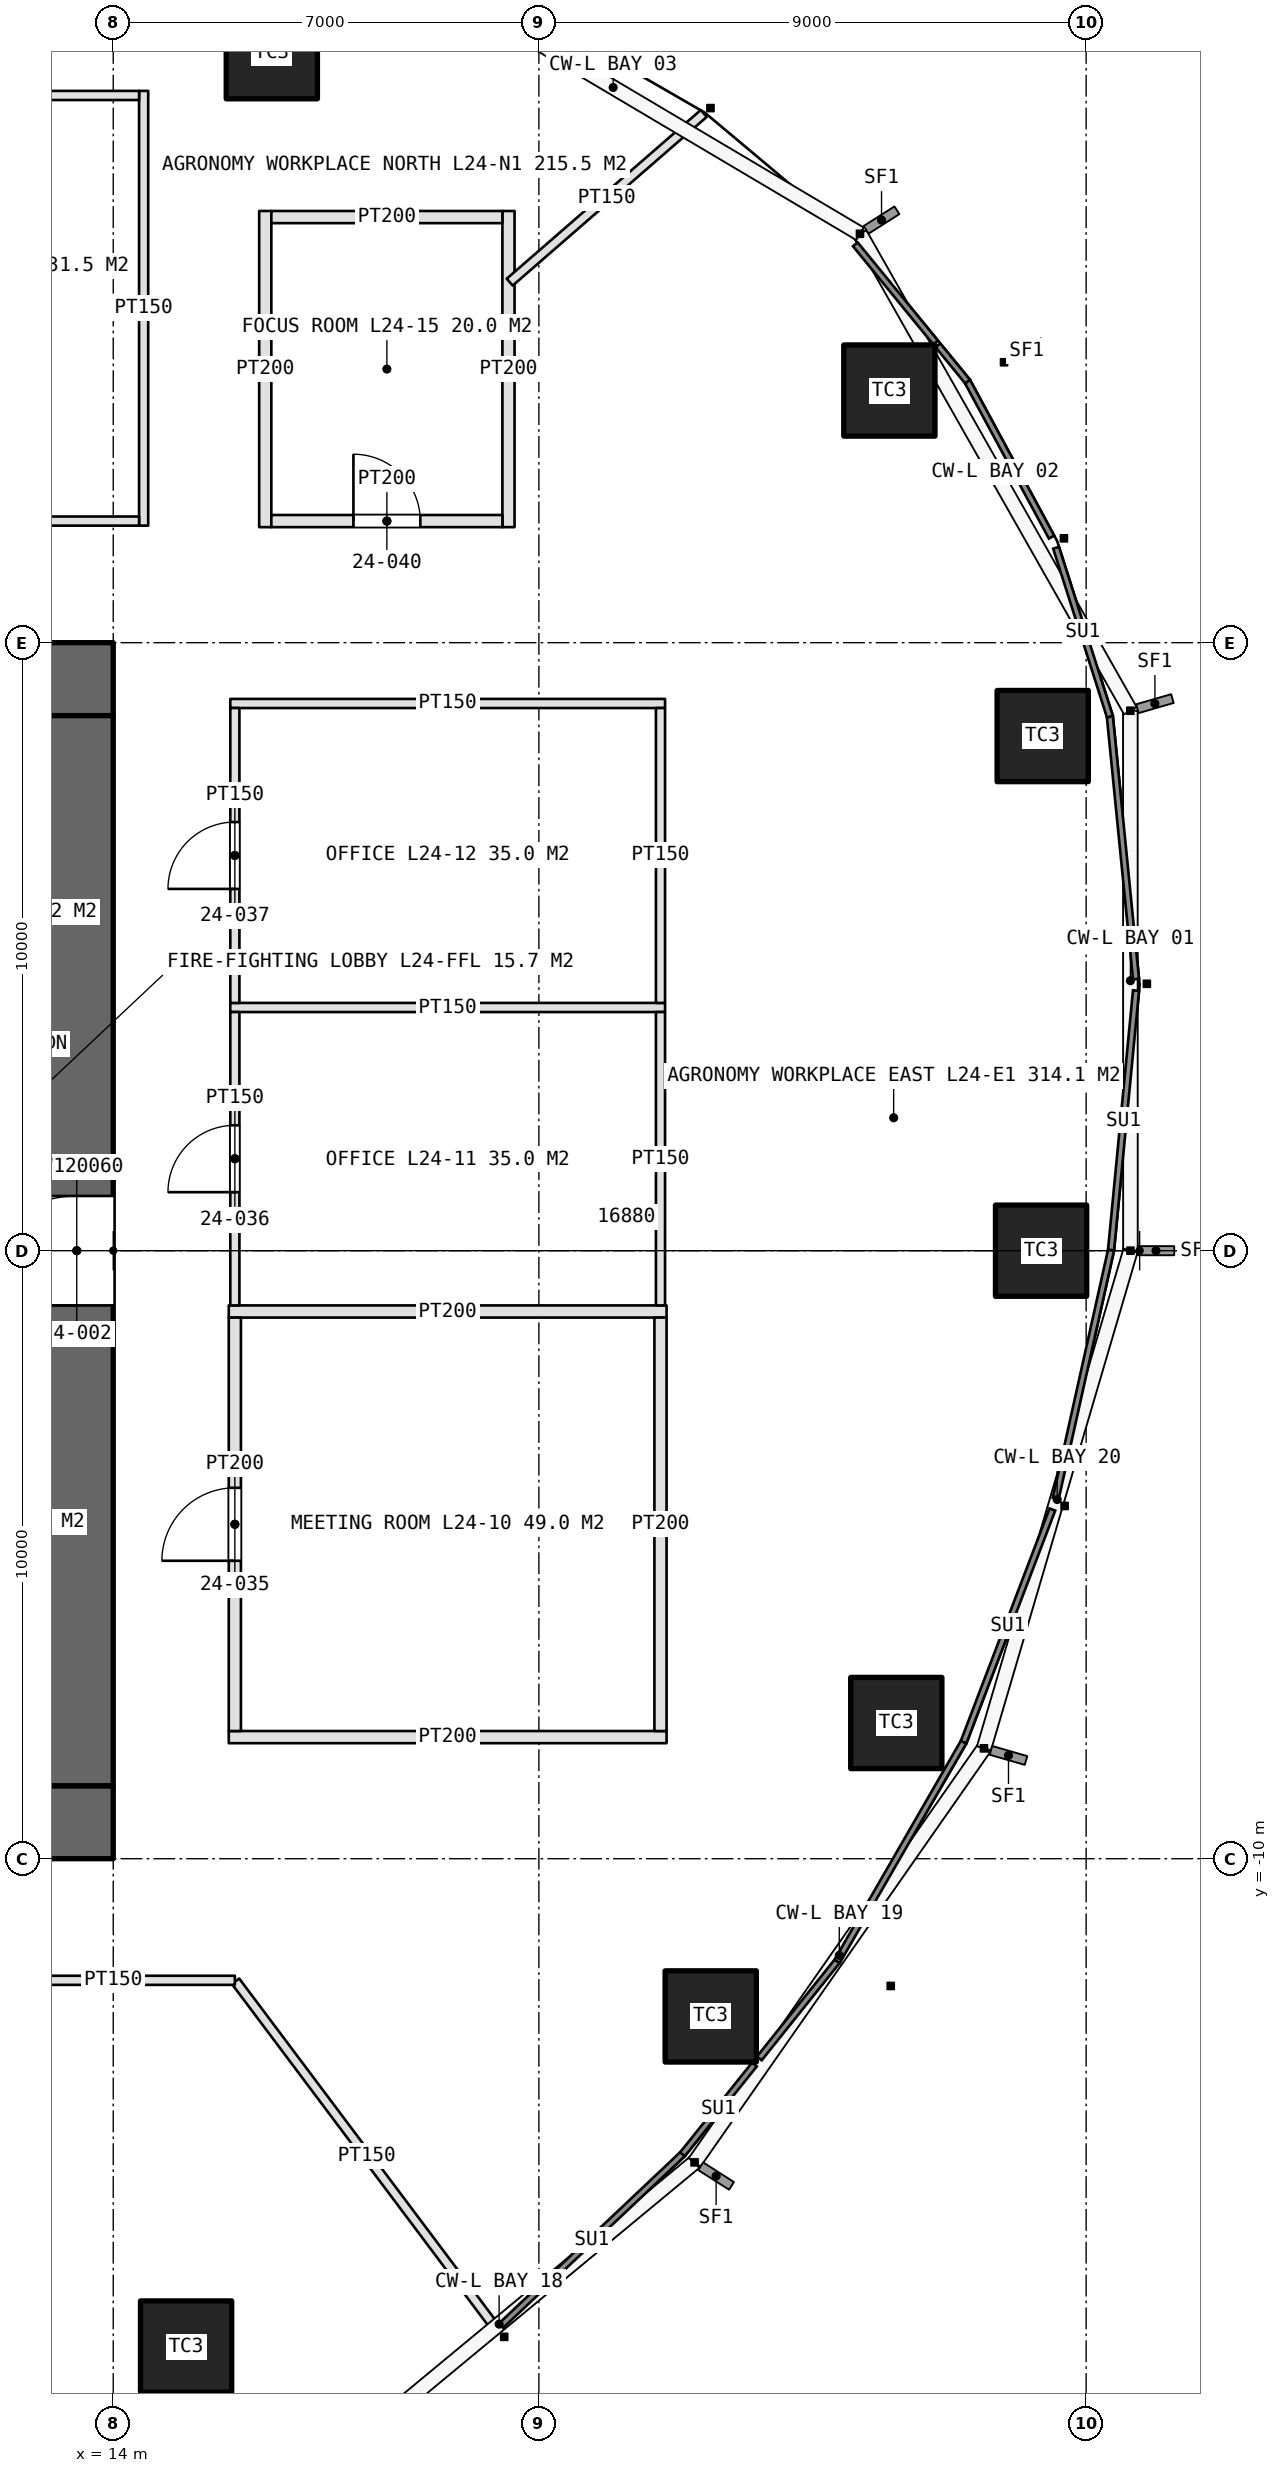
"""IFC4 building model, lengths in metres.
Left out: names, types, materials, properties, quantities, classifications, styles, units other than length and angle.
Written with IfcOpenShell. Run it as: python <this file> out.ifc"""

import sys

from ifc_helpers import new_model, si_unit, direction, frame, frame_2d, origin, origin_2d, place, context, subcontext, project, spatial, rectangle, extrude, element, fill, save


model = new_model("IFC4")
c1 = context("Model", 3, precision=1e-05, world=origin(), true_north=direction((0.0, 1.0)))
c2 = subcontext(c1, "Body", "Model", "MODEL_VIEW")
j1 = project(units=[si_unit("LENGTHUNIT", "METRE"), si_unit("PLANEANGLEUNIT", "RADIAN")], contexts=[c1])
p1 = place(None, origin())
s1 = spatial("IfcSite", under=j1, at=p1, CompositionType="ELEMENT")
p2 = place(p1, origin())
s2 = spatial("IfcBuilding", under=s1, at=p2, CompositionType="ELEMENT")
p3 = place(p2, frame((0.0, 0.0, 117.6)))
s3 = spatial("IfcBuildingStorey", under=s2, at=p3, CompositionType="ELEMENT", Elevation=117.6)
p4 = place(p3, frame((-14.0, -9.4, 0.0), z_axis=(0.0, 0.0, 1.0), x_axis=(1.0, 0.0, 0.0)))
e1 = element("IfcWall", 1, at=p4, inside=s3, PredefinedType="SHEAR", context=c2, shape_type="SweptSolid", body=[
    extrude(rectangle(XDim=28.0, YDim=1.2, at=frame_2d((14.0, 0.0))), origin(), (0.0, 0.0, 1.0), 4.2),
])
p5 = place(p4, frame((13.1, 0.0, 0.0)))
e2 = element("IfcOpeningElement", 2, at=p5, cuts=e1, PredefinedType="OPENING", context=c2, shape_type="SweptSolid", body=[
    extrude(rectangle(XDim=1.8, YDim=2.4, at=frame_2d((0.9, 1.2))), frame((0.0, 0.61, 0.0), z_axis=(0.0, -1.0, 0.0), x_axis=(1.0, 0.0, 0.0)), (0.0, 0.0, 1.0), 1.22),
])
p6 = place(p4, frame((22.9, 0.0, 0.0)))
e3 = element("IfcOpeningElement", 3, at=p6, cuts=e1, PredefinedType="OPENING", context=c2, shape_type="SweptSolid", body=[
    extrude(rectangle(XDim=2.2, YDim=2.7, at=frame_2d((1.1, 1.35))), frame((0.0, 0.61, 0.0), z_axis=(0.0, -1.0, 0.0), x_axis=(1.0, 0.0, 0.0)), (0.0, 0.0, 1.0), 1.22),
])
p7 = place(p3, frame((14.0, 9.4, 0.0), z_axis=(0.0, 0.0, 1.0), x_axis=(-1.0, 0.0, 0.0)))
e4 = element("IfcWall", 4, at=p7, inside=s3, PredefinedType="SHEAR", context=c2, shape_type="SweptSolid", body=[
    extrude(rectangle(XDim=28.0, YDim=1.2, at=frame_2d((14.0, 0.0))), origin(), (0.0, 0.0, 1.0), 4.2),
])
p8 = place(p7, frame((24.0, 0.0, 0.0)))
e5 = element("IfcOpeningElement", 5, at=p8, cuts=e4, PredefinedType="OPENING", context=c2, shape_type="SweptSolid", body=[
    extrude(rectangle(XDim=1.0, YDim=2.4, at=frame_2d((0.5, 1.2))), frame((0.0, 0.61, 0.0), z_axis=(0.0, -1.0, 0.0), x_axis=(1.0, 0.0, 0.0)), (0.0, 0.0, 1.0), 1.22),
])
p9 = place(p7, frame((13.1, 0.0, 0.0)))
e6 = element("IfcOpeningElement", 6, at=p9, cuts=e4, PredefinedType="OPENING", context=c2, shape_type="SweptSolid", body=[
    extrude(rectangle(XDim=1.8, YDim=2.4, at=frame_2d((0.9, 1.2))), frame((0.0, 0.61, 0.0), z_axis=(0.0, -1.0, 0.0), x_axis=(1.0, 0.0, 0.0)), (0.0, 0.0, 1.0), 1.22),
])
p10 = place(p3, frame((13.4, -8.8, 0.0), z_axis=(0.0, 0.0, 1.0), x_axis=(0.0, 1.0, 0.0)))
e7 = element("IfcWall", 7, at=p10, inside=s3, PredefinedType="SHEAR", context=c2, shape_type="SweptSolid", body=[
    extrude(rectangle(XDim=17.6, YDim=1.2, at=frame_2d((8.8, 0.0))), origin(), (0.0, 0.0, 1.0), 4.2),
])
p11 = place(p10, frame((7.9, 0.0, 0.0)))
e8 = element("IfcOpeningElement", 8, at=p11, cuts=e7, PredefinedType="OPENING", context=c2, shape_type="SweptSolid", body=[
    extrude(rectangle(XDim=1.8, YDim=2.4, at=frame_2d((0.9, 1.2))), frame((0.0, 0.61, 0.0), z_axis=(0.0, -1.0, 0.0), x_axis=(1.0, 0.0, 0.0)), (0.0, 0.0, 1.0), 1.22),
])
for number, where, z_axis, x_axis in (
    (9, (29.259, 0.0, 0.0), (0.0, 0.0, 1.0), (1.0, 0.0, 0.0)),
    (10, (29.286, 8.464, 0.0), (0.0, 0.0, 1.0), (1.0, 0.0, 0.0)),
    (11, (26.764, 14.147, 0.0), (0.0, 0.0, 1.0), (1.0, 0.0, 0.0)),
    (12, (16.608, 19.695, 0.0), (0.0, 0.0, 1.0), (1.0, 0.0, 0.0)),
    (13, (15.198, -18.023, 0.0), (0.0, 0.0, 1.0), (1.0, 0.0, 0.0)),
    (14, (23.826, -12.594, 0.0), (0.0, 0.0, 1.0), (1.0, 0.0, 0.0)),
    (15, (26.878, -7.768, 0.0), (0.0, 0.0, 1.0), (1.0, 0.0, 0.0)),
):
    element("IfcColumn", number, at=place(p3, frame(where, z_axis=z_axis, x_axis=x_axis)), inside=s3, PredefinedType="COLUMN", context=c2, shape_type="SweptSolid", body=[
        extrude(rectangle(XDim=1.5, YDim=1.5, at=origin_2d()), origin(), (0.0, 0.0, 1.0), 4.2),
    ])
p12 = place(p3, frame((14.5, 11.925, 0.0), z_axis=(0.0, 0.0, 1.0), x_axis=(0.0, 1.0, 0.0)))
e16 = element("IfcWall", 16, at=p12, inside=s3, PredefinedType="PARTITIONING", context=c2, shape_type="SweptSolid", body=[
    extrude(rectangle(XDim=7.15, YDim=0.15, at=frame_2d((3.575, 0.0))), origin(), (0.0, 0.0, 1.0), 3.0),
])
p13 = place(p3, frame((10.075, 12.0, 0.0), z_axis=(0.0, 0.0, 1.0), x_axis=(1.0, 0.0, 0.0)))
e17 = element("IfcWall", 17, at=p13, inside=s3, PredefinedType="PARTITIONING", context=c2, shape_type="SweptSolid", body=[
    extrude(rectangle(XDim=4.35, YDim=0.15, at=frame_2d((2.175, 0.0))), origin(), (0.0, 0.0, 1.0), 3.0),
])
p14 = place(p13, frame((1.625, 0.0, 0.0)))
e18 = element("IfcOpeningElement", 18, at=p14, cuts=e17, PredefinedType="OPENING", context=c2, shape_type="SweptSolid", body=[
    extrude(rectangle(XDim=1.1, YDim=2.3, at=frame_2d((0.55, 1.15))), frame((0.0, 0.085, 0.0), z_axis=(0.0, -1.0, 0.0), x_axis=(1.0, 0.0, 0.0)), (0.0, 0.0, 1.0), 0.17),
])
p15 = place(p3, frame((10.075, 19.0, 0.0), z_axis=(0.0, 0.0, 1.0), x_axis=(1.0, 0.0, 0.0)))
e19 = element("IfcWall", 19, at=p15, inside=s3, PredefinedType="PARTITIONING", context=c2, shape_type="SweptSolid", body=[
    extrude(rectangle(XDim=4.35, YDim=0.15, at=frame_2d((2.175, 0.0))), origin(), (0.0, 0.0, 1.0), 3.0),
])
for number, where, z_axis, x_axis in (
    (20, (15.9, -8.0, 0.0), (0.0, 0.0, 1.0), (1.0, 0.0, 0.0)),
    (21, (15.9, -1.0, 0.0), (0.0, 0.0, 1.0), (1.0, 0.0, 0.0)),
):
    element("IfcWall", number, at=place(p3, frame(where, z_axis=z_axis, x_axis=x_axis)), inside=s3, PredefinedType="PARTITIONING", context=c2, shape_type="SweptSolid", body=[
        extrude(rectangle(XDim=7.2, YDim=0.2, at=frame_2d((3.6, 0.0))), origin(), (0.0, 0.0, 1.0), 3.0),
    ])
for number, where, z_axis, x_axis in (
    (22, (15.925, 4.0, 0.0), (0.0, 0.0, 1.0), (1.0, 0.0, 0.0)),
    (23, (15.925, 9.0, 0.0), (0.0, 0.0, 1.0), (1.0, 0.0, 0.0)),
):
    element("IfcWall", number, at=place(p3, frame(where, z_axis=z_axis, x_axis=x_axis)), inside=s3, PredefinedType="PARTITIONING", context=c2, shape_type="SweptSolid", body=[
        extrude(rectangle(XDim=7.15, YDim=0.15, at=frame_2d((3.575, 0.0))), origin(), (0.0, 0.0, 1.0), 3.0),
    ])
p16 = place(p3, frame((16.0, -7.9, 0.0), z_axis=(0.0, 0.0, 1.0), x_axis=(0.0, 1.0, 0.0)))
e24 = element("IfcWall", 24, at=p16, inside=s3, PredefinedType="PARTITIONING", context=c2, shape_type="SweptSolid", body=[
    extrude(rectangle(XDim=6.8, YDim=0.2, at=frame_2d((3.4, 0.0))), origin(), (0.0, 0.0, 1.0), 3.0),
])
p17 = place(p16, frame((2.8, 0.0, 0.0)))
e25 = element("IfcOpeningElement", 25, at=p17, cuts=e24, PredefinedType="OPENING", context=c2, shape_type="SweptSolid", body=[
    extrude(rectangle(XDim=1.2, YDim=2.4, at=frame_2d((0.6, 1.2))), frame((0.0, 0.11, 0.0), z_axis=(0.0, -1.0, 0.0), x_axis=(1.0, 0.0, 0.0)), (0.0, 0.0, 1.0), 0.22),
])
p18 = place(p3, frame((23.0, -7.9, 0.0), z_axis=(0.0, 0.0, 1.0), x_axis=(0.0, 1.0, 0.0)))
e26 = element("IfcWall", 26, at=p18, inside=s3, PredefinedType="PARTITIONING", context=c2, shape_type="SweptSolid", body=[
    extrude(rectangle(XDim=6.8, YDim=0.2, at=frame_2d((3.4, 0.0))), origin(), (0.0, 0.0, 1.0), 3.0),
])
p19 = place(p3, frame((16.0, -0.9, 0.0), z_axis=(0.0, 0.0, 1.0), x_axis=(0.0, 1.0, 0.0)))
e27 = element("IfcWall", 27, at=p19, inside=s3, PredefinedType="PARTITIONING", context=c2, shape_type="SweptSolid", body=[
    extrude(rectangle(XDim=4.825, YDim=0.15, at=frame_2d((2.413, 0.0))), origin(), (0.0, 0.0, 1.0), 3.0),
])
p20 = place(p19, frame((1.863, 0.0, 0.0)))
e28 = element("IfcOpeningElement", 28, at=p20, cuts=e27, PredefinedType="OPENING", context=c2, shape_type="SweptSolid", body=[
    extrude(rectangle(XDim=1.1, YDim=2.3, at=frame_2d((0.55, 1.15))), frame((0.0, 0.085, 0.0), z_axis=(0.0, -1.0, 0.0), x_axis=(1.0, 0.0, 0.0)), (0.0, 0.0, 1.0), 0.17),
])
p21 = place(p3, frame((23.0, -0.9, 0.0), z_axis=(0.0, 0.0, 1.0), x_axis=(0.0, 1.0, 0.0)))
e29 = element("IfcWall", 29, at=p21, inside=s3, PredefinedType="PARTITIONING", context=c2, shape_type="SweptSolid", body=[
    extrude(rectangle(XDim=4.825, YDim=0.15, at=frame_2d((2.413, 0.0))), origin(), (0.0, 0.0, 1.0), 3.0),
])
p22 = place(p3, frame((16.0, 4.075, 0.0), z_axis=(0.0, 0.0, 1.0), x_axis=(0.0, 1.0, 0.0)))
e30 = element("IfcWall", 30, at=p22, inside=s3, PredefinedType="PARTITIONING", context=c2, shape_type="SweptSolid", body=[
    extrude(rectangle(XDim=4.85, YDim=0.15, at=frame_2d((2.425, 0.0))), origin(), (0.0, 0.0, 1.0), 3.0),
])
p23 = place(p22, frame((1.875, 0.0, 0.0)))
e31 = element("IfcOpeningElement", 31, at=p23, cuts=e30, PredefinedType="OPENING", context=c2, shape_type="SweptSolid", body=[
    extrude(rectangle(XDim=1.1, YDim=2.3, at=frame_2d((0.55, 1.15))), frame((0.0, 0.085, 0.0), z_axis=(0.0, -1.0, 0.0), x_axis=(1.0, 0.0, 0.0)), (0.0, 0.0, 1.0), 0.17),
])
p24 = place(p3, frame((23.0, 4.075, 0.0), z_axis=(0.0, 0.0, 1.0), x_axis=(0.0, 1.0, 0.0)))
e32 = element("IfcWall", 32, at=p24, inside=s3, PredefinedType="PARTITIONING", context=c2, shape_type="SweptSolid", body=[
    extrude(rectangle(XDim=4.85, YDim=0.15, at=frame_2d((2.425, 0.0))), origin(), (0.0, 0.0, 1.0), 3.0),
])
for number, where, z_axis, x_axis in (
    (33, (16.5, 11.9, 0.0), (0.0, 0.0, 1.0), (0.0, 1.0, 0.0)),
    (34, (20.5, 11.9, 0.0), (0.0, 0.0, 1.0), (0.0, 1.0, 0.0)),
):
    element("IfcWall", number, at=place(p3, frame(where, z_axis=z_axis, x_axis=x_axis)), inside=s3, PredefinedType="PARTITIONING", context=c2, shape_type="SweptSolid", body=[
        extrude(rectangle(XDim=5.2, YDim=0.2, at=frame_2d((2.6, 0.0))), origin(), (0.0, 0.0, 1.0), 3.0),
    ])
p25 = place(p3, frame((16.6, 12.0, 0.0), z_axis=(0.0, 0.0, 1.0), x_axis=(1.0, 0.0, 0.0)))
e35 = element("IfcWall", 35, at=p25, inside=s3, PredefinedType="PARTITIONING", context=c2, shape_type="SweptSolid", body=[
    extrude(rectangle(XDim=3.8, YDim=0.2, at=frame_2d((1.9, 0.0))), origin(), (0.0, 0.0, 1.0), 3.0),
])
p26 = place(p25, frame((1.35, 0.0, 0.0)))
e36 = element("IfcOpeningElement", 36, at=p26, cuts=e35, PredefinedType="OPENING", context=c2, shape_type="SweptSolid", body=[
    extrude(rectangle(XDim=1.1, YDim=2.3, at=frame_2d((0.55, 1.15))), frame((0.0, 0.11, 0.0), z_axis=(0.0, -1.0, 0.0), x_axis=(1.0, 0.0, 0.0)), (0.0, 0.0, 1.0), 0.22),
])
p27 = place(p3, frame((16.6, 17.0, 0.0), z_axis=(0.0, 0.0, 1.0), x_axis=(1.0, 0.0, 0.0)))
e37 = element("IfcWall", 37, at=p27, inside=s3, PredefinedType="PARTITIONING", context=c2, shape_type="SweptSolid", body=[
    extrude(rectangle(XDim=3.8, YDim=0.2, at=frame_2d((1.9, 0.0))), origin(), (0.0, 0.0, 1.0), 3.0),
])
p28 = place(p3, frame((16.012, -12.016, 0.0), z_axis=(0.0, 0.0, 1.0), x_axis=(0.600059749679, -0.799955184254, 0.0)))
e38 = element("IfcWall", 38, at=p28, inside=s3, PredefinedType="PARTITIONING", context=c2, shape_type="SweptSolid", body=[
    extrude(rectangle(XDim=7.191, YDim=0.15, at=frame_2d((3.596, 0.0))), origin(), (0.0, 0.0, 1.0), 3.0),
])
p29 = place(p3, frame((20.52, 15.929, 0.0), z_axis=(0.0, 0.0, 1.0), x_axis=(0.754686299234, 0.656085809745, 0.0)))
e39 = element("IfcWall", 39, at=p29, inside=s3, PredefinedType="PARTITIONING", context=c2, shape_type="SweptSolid", body=[
    extrude(rectangle(XDim=4.229, YDim=0.15, at=frame_2d((2.115, 0.0))), origin(), (0.0, 0.0, 1.0), 3.0),
])
p30 = place(p3, frame((12.0, -12.0, 0.0), z_axis=(0.0, 0.0, 1.0), x_axis=(1.0, 0.0, 0.0)))
e40 = element("IfcWall", 40, at=p30, inside=s3, PredefinedType="PARTITIONING", context=c2, shape_type="SweptSolid", body=[
    extrude(rectangle(XDim=4.0, YDim=0.15, at=frame_2d((2.0, 0.0))), origin(), (0.0, 0.0, 1.0), 3.0),
])
p31 = place(p11, origin())
e41 = element("IfcDoor", 41, at=p31, inside=s3, OperationType="DOUBLE_DOOR_SINGLE_SWING", PredefinedType="DOOR", context=c2, shape_type="SweptSolid", body=[
    extrude(rectangle(XDim=1.8, YDim=2.4, at=frame_2d((0.9, 1.2))), frame((0.0, 0.025, 0.0), z_axis=(0.0, -1.0, 0.0), x_axis=(1.0, 0.0, 0.0)), (0.0, 0.0, 1.0), 0.05),
])
fill(e8, e41)
p32 = place(p17, origin())
e42 = element("IfcDoor", 42, at=p32, inside=s3, OperationType="SINGLE_SWING_LEFT", PredefinedType="DOOR", context=c2, shape_type="SweptSolid", body=[
    extrude(rectangle(XDim=1.2, YDim=2.4, at=frame_2d((0.6, 1.2))), frame((0.0, 0.025, 0.0), z_axis=(0.0, -1.0, 0.0), x_axis=(1.0, 0.0, 0.0)), (0.0, 0.0, 1.0), 0.05),
])
fill(e25, e42)
p33 = place(p20, origin())
e43 = element("IfcDoor", 43, at=p33, inside=s3, OperationType="SINGLE_SWING_LEFT", PredefinedType="DOOR", context=c2, shape_type="SweptSolid", body=[
    extrude(rectangle(XDim=1.1, YDim=2.3, at=frame_2d((0.55, 1.15))), frame((0.0, 0.025, 0.0), z_axis=(0.0, -1.0, 0.0), x_axis=(1.0, 0.0, 0.0)), (0.0, 0.0, 1.0), 0.05),
])
fill(e28, e43)
p34 = place(p23, origin())
e44 = element("IfcDoor", 44, at=p34, inside=s3, OperationType="SINGLE_SWING_LEFT", PredefinedType="DOOR", context=c2, shape_type="SweptSolid", body=[
    extrude(rectangle(XDim=1.1, YDim=2.3, at=frame_2d((0.55, 1.15))), frame((0.0, 0.025, 0.0), z_axis=(0.0, -1.0, 0.0), x_axis=(1.0, 0.0, 0.0)), (0.0, 0.0, 1.0), 0.05),
])
fill(e31, e44)
p35 = place(p26, origin())
e45 = element("IfcDoor", 45, at=p35, inside=s3, OperationType="SINGLE_SWING_LEFT", PredefinedType="DOOR", context=c2, shape_type="SweptSolid", body=[
    extrude(rectangle(XDim=1.1, YDim=2.3, at=frame_2d((0.55, 1.15))), frame((0.0, 0.025, 0.0), z_axis=(0.0, -1.0, 0.0), x_axis=(1.0, 0.0, 0.0)), (0.0, 0.0, 1.0), 0.05),
])
fill(e36, e45)
save(model, sys.argv[1])
